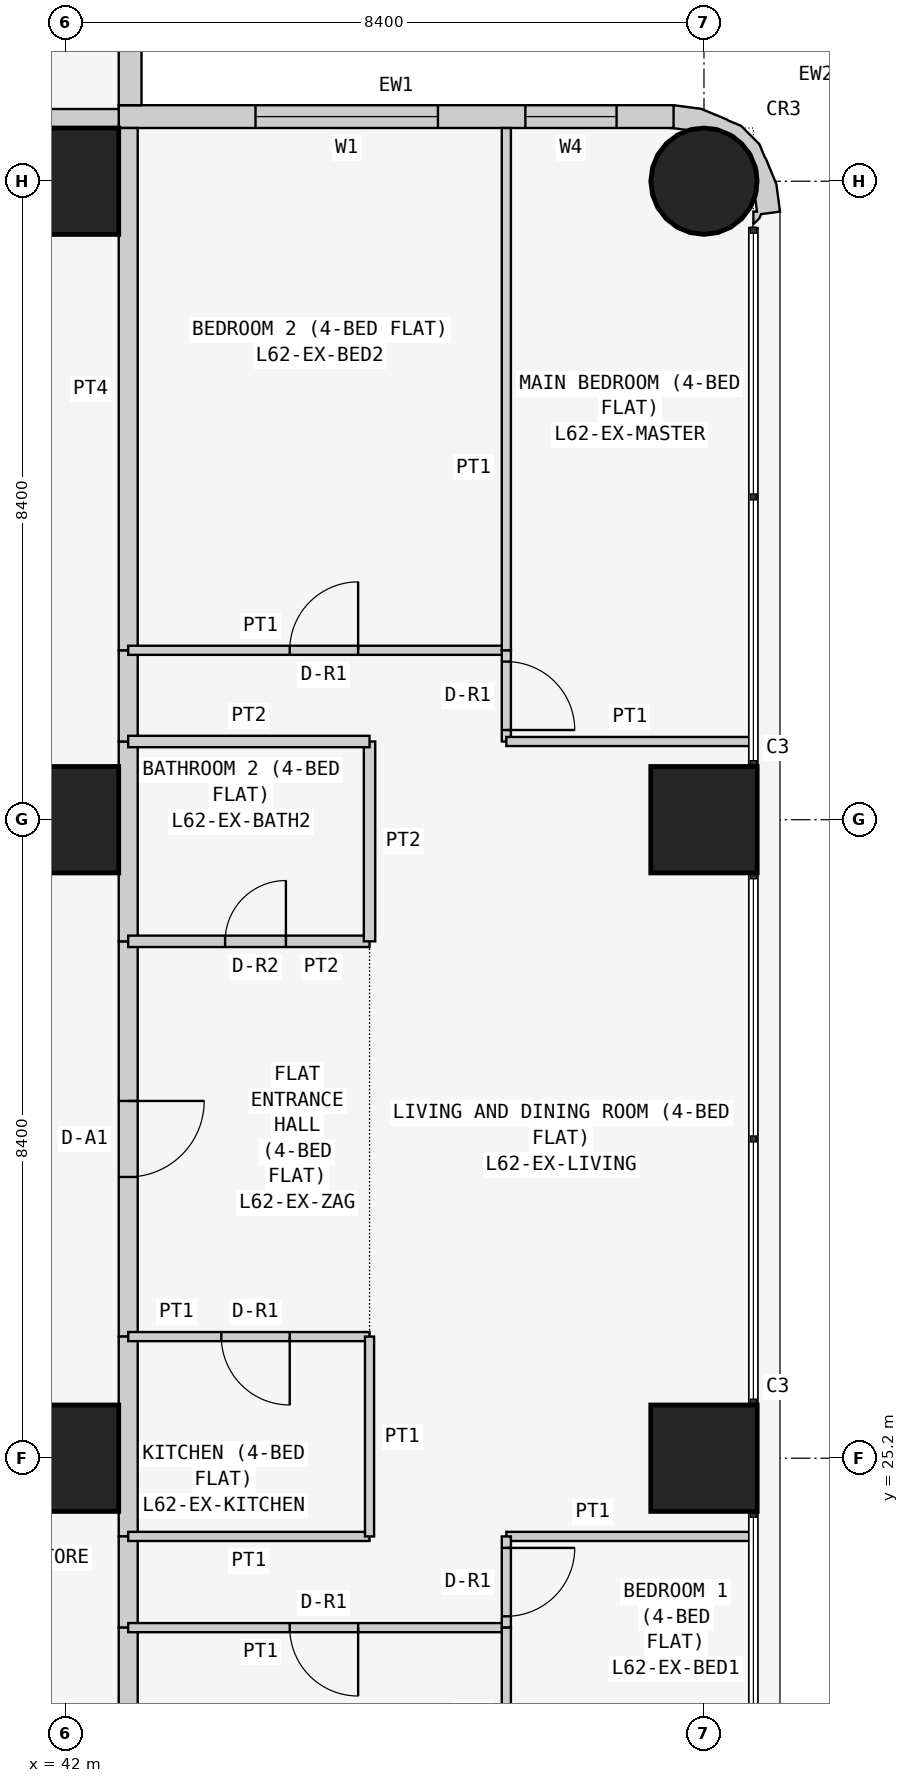
"""IFC4 building model, lengths in metres.
Left out: names, types, materials, properties, quantities, classifications, styles, units other than length and angle.
Written with IfcOpenShell. Run it as: python <this file> out.ifc"""

import sys

from ifc_helpers import new_model, si_unit, direction, frame, frame_2d, origin, origin_2d, place, context, subcontext, project, spatial, polyline, rectangle, circle, outline, extrude, element, fill, save


model = new_model("IFC4")
c1 = context("Model", 3, precision=1e-05, world=origin(), true_north=direction((0.0, 1.0)))
c2 = subcontext(c1, "Body", "Model", "MODEL_VIEW")
j1 = project(units=[si_unit("LENGTHUNIT", "METRE"), si_unit("PLANEANGLEUNIT", "RADIAN")], contexts=[c1])
p1 = place(None, origin())
s1 = spatial("IfcSite", under=j1, at=p1, CompositionType="ELEMENT")
p2 = place(p1, origin())
s2 = spatial("IfcBuilding", under=s1, at=p2, CompositionType="ELEMENT")
p3 = place(p2, frame((0.0, 0.0, 237.3)))
s3 = spatial("IfcBuildingStorey", under=s2, at=p3, CompositionType="ELEMENT", Elevation=237.3)
for number, where, z_axis, x_axis in (
    (1, (42.0, 25.2, 0.0), (0.0, 0.0, 1.0), (1.0, 0.0, 0.0)),
    (2, (42.0, 33.6, 0.0), (0.0, 0.0, 1.0), (1.0, 0.0, 0.0)),
    (3, (42.0, 42.0, 0.0), (0.0, 0.0, 1.0), (1.0, 0.0, 0.0)),
    (4, (50.4, 25.2, 0.0), (0.0, 0.0, 1.0), (1.0, 0.0, 0.0)),
    (5, (50.4, 33.6, 0.0), (0.0, 0.0, 1.0), (1.0, 0.0, 0.0)),
):
    element("IfcColumn", number, at=place(p3, frame(where, z_axis=z_axis, x_axis=x_axis)), inside=s3, PredefinedType="COLUMN", context=c2, shape_type="SweptSolid", body=[
        extrude(rectangle(XDim=1.4, YDim=1.4, at=origin_2d()), origin(), (0.0, 0.0, 1.0), 3.6),
    ])
p4 = place(p3, frame((50.4, 42.0, 0.0), z_axis=(0.0, 0.0, 1.0), x_axis=(1.0, 0.0, 0.0)))
e6 = element("IfcColumn", 6, at=p4, inside=s3, PredefinedType="COLUMN", context=c2, shape_type="SweptSolid", body=[
    extrude(circle(Radius=0.7, at=origin_2d()), origin(), (0.0, 0.0, 1.0), 3.6),
])
p5 = place(p3, frame((50.0, 42.85, 0.0), z_axis=(0.0, 0.0, 1.0), x_axis=(-1.0, 0.0, 0.0)))
e7 = element("IfcWall", 7, at=p5, inside=s3, PredefinedType="SOLIDWALL", context=c2, shape_type="SweptSolid", body=[
    extrude(rectangle(XDim=7.3, YDim=0.3, at=frame_2d((3.65, 0.0))), origin(), (0.0, 0.0, 1.0), 3.45),
])
p6 = place(p5, frame((3.1, 0.0, 0.9)))
e8 = element("IfcOpeningElement", 8, at=p6, cuts=e7, PredefinedType="OPENING", context=c2, shape_type="SweptSolid", body=[
    extrude(rectangle(XDim=2.4, YDim=1.5, at=frame_2d((1.2, 0.75))), frame((0.0, 0.16, 0.0), z_axis=(0.0, -1.0, 0.0), x_axis=(1.0, 0.0, 0.0)), (0.0, 0.0, 1.0), 0.32),
])
p7 = place(p5, frame((0.75, 0.0, 0.9)))
e9 = element("IfcOpeningElement", 9, at=p7, cuts=e7, PredefinedType="OPENING", context=c2, shape_type="SweptSolid", body=[
    extrude(rectangle(XDim=1.2, YDim=1.5, at=frame_2d((0.6, 0.75))), frame((0.0, 0.16, 0.0), z_axis=(0.0, -1.0, 0.0), x_axis=(1.0, 0.0, 0.0)), (0.0, 0.0, 1.0), 0.32),
])
p8 = place(p3, frame((42.85, 43.0, 0.0), z_axis=(0.0, 0.0, 1.0), x_axis=(0.0, 1.0, 0.0)))
e10 = element("IfcWall", 10, at=p8, inside=s3, PredefinedType="SOLIDWALL", context=c2, shape_type="SweptSolid", body=[
    extrude(rectangle(XDim=7.0, YDim=0.3, at=frame_2d((3.5, 0.0))), origin(), (0.0, 0.0, 1.0), 3.45),
])
p9 = place(p8, frame((1.5, 0.0, 0.9)))
e11 = element("IfcOpeningElement", 11, at=p9, cuts=e10, PredefinedType="OPENING", context=c2, shape_type="SweptSolid", body=[
    extrude(rectangle(XDim=2.4, YDim=1.5, at=frame_2d((1.2, 0.75))), frame((0.0, 0.16, 0.0), z_axis=(0.0, -1.0, 0.0), x_axis=(1.0, 0.0, 0.0)), (0.0, 0.0, 1.0), 0.32),
])
p10 = place(p8, frame((5.05, 0.0, 0.9)))
e12 = element("IfcOpeningElement", 12, at=p10, cuts=e10, PredefinedType="OPENING", context=c2, shape_type="SweptSolid", body=[
    extrude(rectangle(XDim=1.2, YDim=1.5, at=frame_2d((0.6, 0.75))), frame((0.0, 0.16, 0.0), z_axis=(0.0, -1.0, 0.0), x_axis=(1.0, 0.0, 0.0)), (0.0, 0.0, 1.0), 0.32),
])
p11 = place(p3, frame((50.988, 41.488, 0.0), z_axis=(0.0, 0.0, 1.0), x_axis=(0.898030234854, 0.439933741929, 0.0)))
e13 = element("IfcWall", 13, at=p11, inside=s3, PredefinedType="SOLIDWALL", context=c2, shape_type="SweptSolid", body=[
    extrude(outline(polyline([(0.138, -0.04), (0.182, -0.0), (0.419, -0.08), (0.536, 0.266), (0.559, 0.631), (0.555, 0.651), (0.566, 0.836), (0.455, 1.159), (0.333, 1.298), (0.324, 1.317), (0.082, 1.591), (-0.222, 1.793), (-0.39, 1.541), (-0.372, 1.532), (-0.195, 1.414), (-0.12, 1.41), (0.131, 1.287), (0.315, 1.078), (0.406, 0.814), (0.388, 0.536), (0.265, 0.285), (0.209, 0.235), (0.148, 0.053), (0.105, 0.074), (0.032, -0.076), (0.138, -0.04)])), origin(), (0.0, 0.0, 1.0), 3.45),
])
p12 = place(p3, frame((35.829, 42.825, 0.0), z_axis=(0.0, 0.0, 1.0), x_axis=(1.0, 0.0, 0.0)))
e14 = element("IfcWall", 14, at=p12, inside=s3, PredefinedType="PARTITIONING", context=c2, shape_type="SweptSolid", body=[
    extrude(rectangle(XDim=6.871, YDim=0.25, at=frame_2d((3.436, 0.0))), origin(), (0.0, 0.0, 1.0), 3.45),
])
p13 = place(p3, frame((42.825, 32.0, 0.0), z_axis=(0.0, 0.0, 1.0), x_axis=(0.0, -1.0, 0.0)))
e15 = element("IfcWall", 15, at=p13, inside=s3, PredefinedType="PARTITIONING", context=c2, shape_type="SweptSolid", body=[
    extrude(rectangle(XDim=5.2, YDim=0.25, at=frame_2d((2.6, 0.0))), origin(), (0.0, 0.0, 1.0), 3.45),
])
p14 = place(p13, frame((2.1, 0.0, 0.0)))
e16 = element("IfcOpeningElement", 16, at=p14, cuts=e15, PredefinedType="OPENING", context=c2, shape_type="SweptSolid", body=[
    extrude(rectangle(XDim=1.0, YDim=2.1, at=frame_2d((0.5, 1.05))), frame((0.0, 0.135, 0.0), z_axis=(0.0, -1.0, 0.0), x_axis=(1.0, 0.0, 0.0)), (0.0, 0.0, 1.0), 0.27),
])
p15 = place(p3, frame((42.825, 34.629, 0.0), z_axis=(0.0, 0.0, 1.0), x_axis=(0.0, -1.0, 0.0)))
e17 = element("IfcWall", 17, at=p15, inside=s3, PredefinedType="PARTITIONING", context=c2, shape_type="SweptSolid", body=[
    extrude(rectangle(XDim=2.629, YDim=0.25, at=frame_2d((1.314, 0.0))), origin(), (0.0, 0.0, 1.0), 3.45),
])
p16 = place(p3, frame((42.825, 26.8, 0.0), z_axis=(0.0, 0.0, 1.0), x_axis=(0.0, -1.0, 0.0)))
e18 = element("IfcWall", 18, at=p16, inside=s3, PredefinedType="PARTITIONING", context=c2, shape_type="SweptSolid", body=[
    extrude(rectangle(XDim=2.629, YDim=0.25, at=frame_2d((1.314, 0.0))), origin(), (0.0, 0.0, 1.0), 3.45),
])
p17 = place(p3, frame((42.825, 24.171, 0.0), z_axis=(0.0, 0.0, 1.0), x_axis=(0.0, -1.0, 0.0)))
e19 = element("IfcWall", 19, at=p17, inside=s3, PredefinedType="PARTITIONING", context=c2, shape_type="SweptSolid", body=[
    extrude(rectangle(XDim=1.2, YDim=0.25, at=frame_2d((0.6, 0.0))), origin(), (0.0, 0.0, 1.0), 3.45),
])
p18 = place(p3, frame((42.825, 35.829, 0.0), z_axis=(0.0, 0.0, 1.0), x_axis=(0.0, -1.0, 0.0)))
e20 = element("IfcWall", 20, at=p18, inside=s3, PredefinedType="PARTITIONING", context=c2, shape_type="SweptSolid", body=[
    extrude(rectangle(XDim=1.2, YDim=0.25, at=frame_2d((0.6, 0.0))), origin(), (0.0, 0.0, 1.0), 3.45),
])
for number, where, z_axis, x_axis in (
    (21, (42.825, 42.7, 0.0), (0.0, 0.0, 1.0), (0.0, -1.0, 0.0)),
    (22, (42.825, 22.971, 0.0), (0.0, 0.0, 1.0), (0.0, -1.0, 0.0)),
):
    element("IfcWall", number, at=place(p3, frame(where, z_axis=z_axis, x_axis=x_axis)), inside=s3, PredefinedType="PARTITIONING", context=c2, shape_type="SweptSolid", body=[
        extrude(rectangle(XDim=6.871, YDim=0.25, at=frame_2d((3.436, 0.0))), origin(), (0.0, 0.0, 1.0), 3.45),
    ])
p19 = place(p3, frame((46.0, 32.0, 0.0), z_axis=(0.0, 0.0, 1.0), x_axis=(-1.0, 0.0, 0.0)))
e23 = element("IfcWall", 23, at=p19, inside=s3, PredefinedType="PARTITIONING", context=c2, shape_type="SweptSolid", body=[
    extrude(rectangle(XDim=3.175, YDim=0.15, at=frame_2d((1.587, 0.0))), origin(), (0.0, 0.0, 1.0), 3.45),
])
p20 = place(p19, frame((1.1, 0.0, 0.0)))
e24 = element("IfcOpeningElement", 24, at=p20, cuts=e23, PredefinedType="OPENING", context=c2, shape_type="SweptSolid", body=[
    extrude(rectangle(XDim=0.8, YDim=2.1, at=frame_2d((0.4, 1.05))), frame((0.0, 0.085, 0.0), z_axis=(0.0, -1.0, 0.0), x_axis=(1.0, 0.0, 0.0)), (0.0, 0.0, 1.0), 0.17),
])
p21 = place(p3, frame((42.825, 26.8, 0.0), z_axis=(0.0, 0.0, 1.0), x_axis=(1.0, 0.0, 0.0)))
e25 = element("IfcWall", 25, at=p21, inside=s3, PredefinedType="PARTITIONING", context=c2, shape_type="SweptSolid", body=[
    extrude(rectangle(XDim=3.175, YDim=0.12, at=frame_2d((1.587, 0.0))), origin(), (0.0, 0.0, 1.0), 3.45),
])
p22 = place(p21, frame((1.225, 0.0, 0.0)))
e26 = element("IfcOpeningElement", 26, at=p22, cuts=e25, PredefinedType="OPENING", context=c2, shape_type="SweptSolid", body=[
    extrude(rectangle(XDim=0.9, YDim=2.1, at=frame_2d((0.45, 1.05))), frame((0.0, 0.07, 0.0), z_axis=(0.0, -1.0, 0.0), x_axis=(1.0, 0.0, 0.0)), (0.0, 0.0, 1.0), 0.14),
])
p23 = place(p3, frame((46.0, 32.0, 0.0), z_axis=(0.0, 0.0, 1.0), x_axis=(0.0, 1.0, 0.0)))
e27 = element("IfcWall", 27, at=p23, inside=s3, PredefinedType="PARTITIONING", context=c2, shape_type="SweptSolid", body=[
    extrude(rectangle(XDim=2.629, YDim=0.15, at=frame_2d((1.314, 0.0))), origin(), (0.0, 0.0, 1.0), 3.45),
])
p24 = place(p3, frame((46.0, 34.629, 0.0), z_axis=(0.0, 0.0, 1.0), x_axis=(-1.0, 0.0, 0.0)))
e28 = element("IfcWall", 28, at=p24, inside=s3, PredefinedType="PARTITIONING", context=c2, shape_type="SweptSolid", body=[
    extrude(rectangle(XDim=3.175, YDim=0.15, at=frame_2d((1.587, 0.0))), origin(), (0.0, 0.0, 1.0), 3.45),
])
p25 = place(p3, frame((42.825, 24.171, 0.0), z_axis=(0.0, 0.0, 1.0), x_axis=(1.0, 0.0, 0.0)))
e29 = element("IfcWall", 29, at=p25, inside=s3, PredefinedType="PARTITIONING", context=c2, shape_type="SweptSolid", body=[
    extrude(rectangle(XDim=3.175, YDim=0.12, at=frame_2d((1.587, 0.0))), origin(), (0.0, 0.0, 1.0), 3.45),
])
p26 = place(p3, frame((46.0, 24.171, 0.0), z_axis=(0.0, 0.0, 1.0), x_axis=(0.0, 1.0, 0.0)))
e30 = element("IfcWall", 30, at=p26, inside=s3, PredefinedType="PARTITIONING", context=c2, shape_type="SweptSolid", body=[
    extrude(rectangle(XDim=2.629, YDim=0.12, at=frame_2d((1.314, 0.0))), origin(), (0.0, 0.0, 1.0), 3.45),
])
p27 = place(p3, frame((42.825, 35.829, 0.0), z_axis=(0.0, 0.0, 1.0), x_axis=(1.0, 0.0, 0.0)))
e31 = element("IfcWall", 31, at=p27, inside=s3, PredefinedType="PARTITIONING", context=c2, shape_type="SweptSolid", body=[
    extrude(rectangle(XDim=4.975, YDim=0.12, at=frame_2d((2.488, 0.0))), origin(), (0.0, 0.0, 1.0), 3.45),
])
p28 = place(p27, frame((2.125, 0.0, 0.0)))
e32 = element("IfcOpeningElement", 32, at=p28, cuts=e31, PredefinedType="OPENING", context=c2, shape_type="SweptSolid", body=[
    extrude(rectangle(XDim=0.9, YDim=2.1, at=frame_2d((0.45, 1.05))), frame((0.0, 0.07, 0.0), z_axis=(0.0, -1.0, 0.0), x_axis=(1.0, 0.0, 0.0)), (0.0, 0.0, 1.0), 0.14),
])
p29 = place(p3, frame((47.8, 35.829, 0.0), z_axis=(0.0, 0.0, 1.0), x_axis=(0.0, -1.0, 0.0)))
e33 = element("IfcWall", 33, at=p29, inside=s3, PredefinedType="PARTITIONING", context=c2, shape_type="SweptSolid", body=[
    extrude(rectangle(XDim=1.2, YDim=0.12, at=frame_2d((0.6, 0.0))), origin(), (0.0, 0.0, 1.0), 3.45),
])
p30 = place(p29, frame((0.149, 0.0, 0.0)))
e34 = element("IfcOpeningElement", 34, at=p30, cuts=e33, PredefinedType="OPENING", context=c2, shape_type="SweptSolid", body=[
    extrude(rectangle(XDim=0.9, YDim=2.1, at=frame_2d((0.45, 1.05))), frame((0.0, 0.07, 0.0), z_axis=(0.0, -1.0, 0.0), x_axis=(1.0, 0.0, 0.0)), (0.0, 0.0, 1.0), 0.14),
])
p31 = place(p3, frame((47.8, 34.629, 0.0), z_axis=(0.0, 0.0, 1.0), x_axis=(1.0, 0.0, 0.0)))
e35 = element("IfcWall", 35, at=p31, inside=s3, PredefinedType="PARTITIONING", context=c2, shape_type="SweptSolid", body=[
    extrude(rectangle(XDim=3.25, YDim=0.12, at=frame_2d((1.625, 0.0))), origin(), (0.0, 0.0, 1.0), 3.45),
])
p32 = place(p3, frame((47.8, 22.971, 0.0), z_axis=(0.0, 0.0, 1.0), x_axis=(-1.0, 0.0, 0.0)))
e36 = element("IfcWall", 36, at=p32, inside=s3, PredefinedType="PARTITIONING", context=c2, shape_type="SweptSolid", body=[
    extrude(rectangle(XDim=4.975, YDim=0.12, at=frame_2d((2.488, 0.0))), origin(), (0.0, 0.0, 1.0), 3.45),
])
p33 = place(p32, frame((1.95, 0.0, 0.0)))
e37 = element("IfcOpeningElement", 37, at=p33, cuts=e36, PredefinedType="OPENING", context=c2, shape_type="SweptSolid", body=[
    extrude(rectangle(XDim=0.9, YDim=2.1, at=frame_2d((0.45, 1.05))), frame((0.0, 0.07, 0.0), z_axis=(0.0, -1.0, 0.0), x_axis=(1.0, 0.0, 0.0)), (0.0, 0.0, 1.0), 0.14),
])
p34 = place(p3, frame((51.05, 24.171, 0.0), z_axis=(0.0, 0.0, 1.0), x_axis=(-1.0, 0.0, 0.0)))
e38 = element("IfcWall", 38, at=p34, inside=s3, PredefinedType="PARTITIONING", context=c2, shape_type="SweptSolid", body=[
    extrude(rectangle(XDim=3.25, YDim=0.12, at=frame_2d((1.625, 0.0))), origin(), (0.0, 0.0, 1.0), 3.45),
])
p35 = place(p3, frame((47.8, 24.171, 0.0), z_axis=(0.0, 0.0, 1.0), x_axis=(0.0, -1.0, 0.0)))
e39 = element("IfcWall", 39, at=p35, inside=s3, PredefinedType="PARTITIONING", context=c2, shape_type="SweptSolid", body=[
    extrude(rectangle(XDim=1.2, YDim=0.12, at=frame_2d((0.6, 0.0))), origin(), (0.0, 0.0, 1.0), 3.45),
])
p36 = place(p35, frame((0.151, 0.0, 0.0)))
e40 = element("IfcOpeningElement", 40, at=p36, cuts=e39, PredefinedType="OPENING", context=c2, shape_type="SweptSolid", body=[
    extrude(rectangle(XDim=0.9, YDim=2.1, at=frame_2d((0.45, 1.05))), frame((0.0, 0.07, 0.0), z_axis=(0.0, -1.0, 0.0), x_axis=(1.0, 0.0, 0.0)), (0.0, 0.0, 1.0), 0.14),
])
p37 = place(p3, frame((47.8, 35.829, 0.0), z_axis=(0.0, 0.0, 1.0), x_axis=(0.0, 1.0, 0.0)))
e41 = element("IfcWall", 41, at=p37, inside=s3, PredefinedType="PARTITIONING", context=c2, shape_type="SweptSolid", body=[
    extrude(rectangle(XDim=6.871, YDim=0.12, at=frame_2d((3.436, 0.0))), origin(), (0.0, 0.0, 1.0), 3.45),
])
p38 = place(p3, frame((47.8, 20.686, 0.0), z_axis=(0.0, 0.0, 1.0), x_axis=(0.0, 1.0, 0.0)))
e42 = element("IfcWall", 42, at=p38, inside=s3, PredefinedType="PARTITIONING", context=c2, shape_type="SweptSolid", body=[
    extrude(rectangle(XDim=2.285, YDim=0.12, at=frame_2d((1.143, 0.0))), origin(), (0.0, 0.0, 1.0), 3.45),
])
p39 = place(p6, origin())
e43 = element("IfcWindow", 43, at=p39, inside=s3, PartitioningType="SINGLE_PANEL", PredefinedType="WINDOW", context=c2, shape_type="SweptSolid", body=[
    extrude(rectangle(XDim=2.4, YDim=1.5, at=frame_2d((1.2, 0.75))), frame((0.0, 0.03, 0.0), z_axis=(0.0, -1.0, 0.0), x_axis=(1.0, 0.0, 0.0)), (0.0, 0.0, 1.0), 0.06),
])
fill(e8, e43)
p40 = place(p7, origin())
e44 = element("IfcWindow", 44, at=p40, inside=s3, PartitioningType="SINGLE_PANEL", PredefinedType="WINDOW", context=c2, shape_type="SweptSolid", body=[
    extrude(rectangle(XDim=1.2, YDim=1.5, at=frame_2d((0.6, 0.75))), frame((0.0, 0.03, 0.0), z_axis=(0.0, -1.0, 0.0), x_axis=(1.0, 0.0, 0.0)), (0.0, 0.0, 1.0), 0.06),
])
fill(e9, e44)
p41 = place(p14, origin())
e45 = element("IfcDoor", 45, at=p41, inside=s3, OperationType="SINGLE_SWING_LEFT", PredefinedType="DOOR", context=c2, shape_type="SweptSolid", body=[
    extrude(rectangle(XDim=1.0, YDim=2.1, at=frame_2d((0.5, 1.05))), frame((0.0, 0.025, 0.0), z_axis=(0.0, -1.0, 0.0), x_axis=(1.0, 0.0, 0.0)), (0.0, 0.0, 1.0), 0.05),
])
fill(e16, e45)
p42 = place(p20, frame((0.8, 0.0, 0.0), z_axis=(0.0, 0.0, 1.0), x_axis=(-1.0, 0.0, 0.0)))
e46 = element("IfcDoor", 46, at=p42, inside=s3, OperationType="SINGLE_SWING_RIGHT", PredefinedType="DOOR", context=c2, shape_type="SweptSolid", body=[
    extrude(rectangle(XDim=0.8, YDim=2.1, at=frame_2d((0.4, 1.05))), frame((0.0, 0.025, 0.0), z_axis=(0.0, -1.0, 0.0), x_axis=(1.0, 0.0, 0.0)), (0.0, 0.0, 1.0), 0.05),
])
fill(e24, e46)
p43 = place(p22, frame((0.9, 0.0, 0.0), z_axis=(0.0, 0.0, 1.0), x_axis=(-1.0, 0.0, 0.0)))
e47 = element("IfcDoor", 47, at=p43, inside=s3, OperationType="SINGLE_SWING_LEFT", PredefinedType="DOOR", context=c2, shape_type="SweptSolid", body=[
    extrude(rectangle(XDim=0.9, YDim=2.1, at=frame_2d((0.45, 1.05))), frame((0.0, 0.025, 0.0), z_axis=(0.0, -1.0, 0.0), x_axis=(1.0, 0.0, 0.0)), (0.0, 0.0, 1.0), 0.05),
])
fill(e26, e47)
p44 = place(p28, origin())
e48 = element("IfcDoor", 48, at=p44, inside=s3, OperationType="SINGLE_SWING_RIGHT", PredefinedType="DOOR", context=c2, shape_type="SweptSolid", body=[
    extrude(rectangle(XDim=0.9, YDim=2.1, at=frame_2d((0.45, 1.05))), frame((0.0, 0.025, 0.0), z_axis=(0.0, -1.0, 0.0), x_axis=(1.0, 0.0, 0.0)), (0.0, 0.0, 1.0), 0.05),
])
fill(e32, e48)
p45 = place(p30, origin())
e49 = element("IfcDoor", 49, at=p45, inside=s3, OperationType="SINGLE_SWING_RIGHT", PredefinedType="DOOR", context=c2, shape_type="SweptSolid", body=[
    extrude(rectangle(XDim=0.9, YDim=2.1, at=frame_2d((0.45, 1.05))), frame((0.0, 0.025, 0.0), z_axis=(0.0, -1.0, 0.0), x_axis=(1.0, 0.0, 0.0)), (0.0, 0.0, 1.0), 0.05),
])
fill(e34, e49)
p46 = place(p33, origin())
e50 = element("IfcDoor", 50, at=p46, inside=s3, OperationType="SINGLE_SWING_LEFT", PredefinedType="DOOR", context=c2, shape_type="SweptSolid", body=[
    extrude(rectangle(XDim=0.9, YDim=2.1, at=frame_2d((0.45, 1.05))), frame((0.0, 0.025, 0.0), z_axis=(0.0, -1.0, 0.0), x_axis=(1.0, 0.0, 0.0)), (0.0, 0.0, 1.0), 0.05),
])
fill(e37, e50)
p47 = place(p36, origin())
e51 = element("IfcDoor", 51, at=p47, inside=s3, OperationType="SINGLE_SWING_LEFT", PredefinedType="DOOR", context=c2, shape_type="SweptSolid", body=[
    extrude(rectangle(XDim=0.9, YDim=2.1, at=frame_2d((0.45, 1.05))), frame((0.0, 0.025, 0.0), z_axis=(0.0, -1.0, 0.0), x_axis=(1.0, 0.0, 0.0)), (0.0, 0.0, 1.0), 0.05),
])
fill(e40, e51)
save(model, sys.argv[1])
